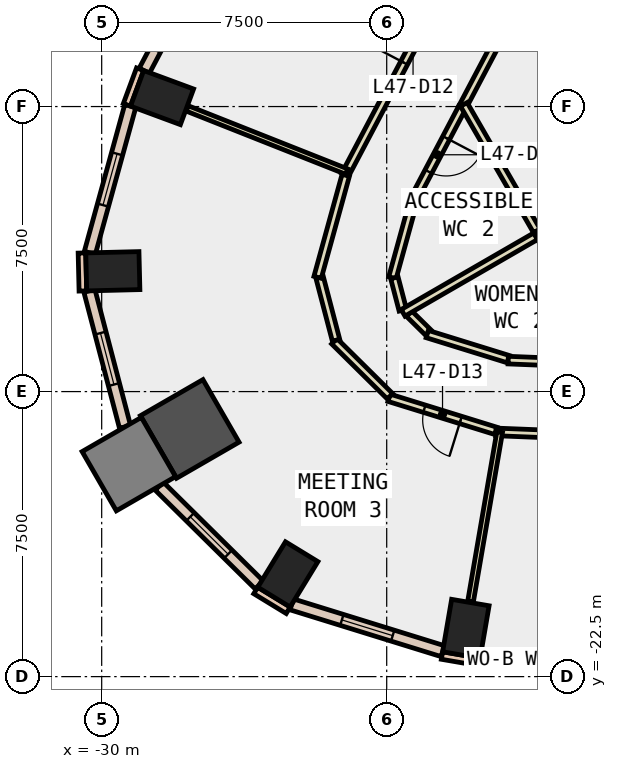
"""IFC4 building model, lengths in metres.
Left out: names, types, materials, properties, quantities, classifications, styles, units other than length and angle.
Written with IfcOpenShell. Run it as: python <this file> out.ifc"""

import sys

from ifc_helpers import new_model, si_unit, direction, frame, frame_2d, origin, origin_2d, place, context, subcontext, project, spatial, rectangle, extrude, element, fill, save


model = new_model("IFC4")
c1 = context("Model", 3, precision=1e-05, world=origin(), true_north=direction((0.0, 1.0)))
c2 = subcontext(c1, "Body", "Model", "MODEL_VIEW")
j1 = project(units=[si_unit("LENGTHUNIT", "METRE"), si_unit("PLANEANGLEUNIT", "RADIAN")], contexts=[c1])
p1 = place(None, origin())
s1 = spatial("IfcSite", under=j1, at=p1, CompositionType="ELEMENT")
p2 = place(p1, origin())
s2 = spatial("IfcBuilding", under=s1, at=p2, CompositionType="ELEMENT")
p3 = place(p2, frame((0.0, 0.0, 210.8)))
s3 = spatial("IfcBuildingStorey", under=s2, at=p3, CompositionType="ELEMENT", Elevation=210.8)
for number, where, z_axis, x_axis in (
    (1, (-20.417, -21.241, -0.4), (0.0, 0.0, 1.0), (-0.986, 0.169, 0.0)),
    (2, (-28.412, -7.264, -0.4), (0.0, 0.0, 1.0), (0.347, 0.938, 0.0)),
    (3, (-29.707, -11.834, -0.4), (0.0, 0.0, 1.0), (-0.025, 1.0, 0.0)),
):
    element("IfcColumn", number, at=place(p3, frame(where, z_axis=z_axis, x_axis=x_axis)), inside=s3, PredefinedType="COLUMN", context=c2, shape_type="SweptSolid", body=[
        extrude(rectangle(XDim=1.0, YDim=1.4, at=origin_2d()), origin(), (0.0, 0.0, 1.0), 4.2),
    ])
p4 = place(p3, frame((-27.683, -15.983, -0.4), z_axis=(0.0, 0.0, 1.0), x_axis=(0.866025403784, 0.5, 0.0)))
e4 = element("IfcColumn", 4, at=p4, inside=s3, PredefinedType="COLUMN", context=c2, shape_type="SweptSolid", body=[
    extrude(rectangle(XDim=1.9, YDim=1.9, at=origin_2d()), origin(), (0.0, 0.0, 1.0), 4.2),
])
p5 = place(p3, frame((-25.102, -19.811, -0.4), z_axis=(0.0, 0.0, 1.0), x_axis=(-0.853423465127, 0.521218178089, 0.0)))
e5 = element("IfcColumn", 5, at=p5, inside=s3, PredefinedType="COLUMN", context=c2, shape_type="SweptSolid", body=[
    extrude(rectangle(XDim=1.0, YDim=1.4, at=origin_2d()), origin(), (0.0, 0.0, 1.0), 4.2),
])
p6 = place(p3, frame((-29.285, -16.908, -0.4), z_axis=(0.0, 0.0, 1.0), x_axis=(0.866025403784, 0.5, 0.0)))
e6 = element("IfcColumn", 6, at=p6, inside=s3, PredefinedType="COLUMN", context=c2, shape_type="SweptSolid", body=[
    extrude(rectangle(XDim=1.8, YDim=1.8, at=origin_2d()), origin(), (0.0, 0.0, 1.0), 4.2),
])
p7 = place(p3, frame((-28.989, -6.518, 0.0), z_axis=(0.0, 0.0, 1.0), x_axis=(-0.346892928577, -0.937904737222, 0.0)))
e7 = element("IfcWall", 7, at=p7, inside=s3, PredefinedType="STANDARD", context=c2, shape_type="SweptSolid", body=[
    extrude(rectangle(XDim=1.0, YDim=0.2, at=frame_2d((0.5, 0.0))), origin(), (0.0, 0.0, 1.0), 3.8),
])
p8 = place(p3, frame((-21.045, -21.945, 0.0), z_axis=(0.0, 0.0, 1.0), x_axis=(0.985631544579, -0.168909615862, 0.0)))
e8 = element("IfcWall", 8, at=p8, inside=s3, PredefinedType="STANDARD", context=c2, shape_type="SweptSolid", body=[
    extrude(rectangle(XDim=1.0, YDim=0.2, at=frame_2d((0.5, 0.0))), origin(), (0.0, 0.0, 1.0), 3.8),
])
p9 = place(p3, frame((-30.519, -11.354, 0.0), z_axis=(0.0, 0.0, 1.0), x_axis=(0.023942303888, -0.999713341956, 0.0)))
e9 = element("IfcWall", 9, at=p9, inside=s3, PredefinedType="STANDARD", context=c2, shape_type="SweptSolid", body=[
    extrude(rectangle(XDim=0.999, YDim=0.2, at=frame_2d((0.5, 0.0))), origin(), (0.0, 0.0, 1.0), 3.8),
])
p10 = place(p3, frame((-25.946, -20.233, 0.0), z_axis=(0.0, 0.0, 1.0), x_axis=(0.853679739553, -0.520798331677, 0.0)))
e10 = element("IfcWall", 10, at=p10, inside=s3, PredefinedType="STANDARD", context=c2, shape_type="SweptSolid", body=[
    extrude(rectangle(XDim=1.0, YDim=0.2, at=frame_2d((0.5, 0.0))), origin(), (0.0, 0.0, 1.0), 3.8),
])
p11 = place(p3, frame((-20.04, -21.999, 0.0), z_axis=(0.0, 0.0, 1.0), x_axis=(0.999205241612, -0.039860822062, 0.0)))
e11 = element("IfcWall", 11, at=p11, inside=s3, PredefinedType="STANDARD", context=c2, shape_type="SweptSolid", body=[
    extrude(rectangle(XDim=5.365, YDim=0.3, at=frame_2d((2.683, 0.0))), origin(), (0.0, 0.0, 1.0), 3.8),
])
p12 = place(p11, frame((0.641, 0.0, 0.9)))
e12 = element("IfcOpeningElement", 12, at=p12, cuts=e11, PredefinedType="OPENING", context=c2, shape_type="SweptSolid", body=[
    extrude(rectangle(XDim=1.4, YDim=2.6, at=frame_2d((0.7, 1.3))), frame((0.0, 0.16, 0.0), z_axis=(0.0, -1.0, 0.0), x_axis=(1.0, 0.0, 0.0)), (0.0, 0.0, 1.0), 0.32),
])
p13 = place(p11, frame((3.324, 0.0, 0.9)))
e13 = element("IfcOpeningElement", 13, at=p13, cuts=e11, PredefinedType="OPENING", context=c2, shape_type="SweptSolid", body=[
    extrude(rectangle(XDim=1.4, YDim=2.6, at=frame_2d((0.7, 1.3))), frame((0.0, 0.16, 0.0), z_axis=(0.0, -1.0, 0.0), x_axis=(1.0, 0.0, 0.0)), (0.0, 0.0, 1.0), 0.32),
])
p14 = place(p3, frame((-25.484, -0.127, 0.0), z_axis=(0.0, 0.0, 1.0), x_axis=(-0.466789249342, -0.884368586449, 0.0)))
e14 = element("IfcWall", 14, at=p14, inside=s3, PredefinedType="STANDARD", context=c2, shape_type="SweptSolid", body=[
    extrude(rectangle(XDim=7.273, YDim=0.3, at=frame_2d((3.637, 0.0))), origin(), (0.0, 0.0, 1.0), 3.8),
])
p15 = place(p14, frame((0.618, 0.0, 0.9)))
e15 = element("IfcOpeningElement", 15, at=p15, cuts=e14, PredefinedType="OPENING", context=c2, shape_type="SweptSolid", body=[
    extrude(rectangle(XDim=2.4, YDim=2.6, at=frame_2d((1.2, 1.3))), frame((0.0, 0.16, 0.0), z_axis=(0.0, -1.0, 0.0), x_axis=(1.0, 0.0, 0.0)), (0.0, 0.0, 1.0), 0.32),
])
p16 = place(p14, frame((4.255, 0.0, 0.9)))
e16 = element("IfcOpeningElement", 16, at=p16, cuts=e14, PredefinedType="OPENING", context=c2, shape_type="SweptSolid", body=[
    extrude(rectangle(XDim=2.4, YDim=2.6, at=frame_2d((1.2, 1.3))), frame((0.0, 0.16, 0.0), z_axis=(0.0, -1.0, 0.0), x_axis=(1.0, 0.0, 0.0)), (0.0, 0.0, 1.0), 0.32),
])
p17 = place(p3, frame((-29.248, -7.487, 0.0), z_axis=(0.0, 0.0, 1.0), x_axis=(-0.265534577923, -0.96410133696, 0.0)))
e17 = element("IfcWall", 17, at=p17, inside=s3, PredefinedType="STANDARD", context=c2, shape_type="SweptSolid", body=[
    extrude(rectangle(XDim=4.007, YDim=0.3, at=frame_2d((2.003, 0.0))), origin(), (0.0, 0.0, 1.0), 3.8),
])
p18 = place(p17, frame((1.303, 0.0, 0.9)))
e18 = element("IfcOpeningElement", 18, at=p18, cuts=e17, PredefinedType="OPENING", context=c2, shape_type="SweptSolid", body=[
    extrude(rectangle(XDim=1.4, YDim=2.6, at=frame_2d((0.7, 1.3))), frame((0.0, 0.16, 0.0), z_axis=(0.0, -1.0, 0.0), x_axis=(1.0, 0.0, 0.0)), (0.0, 0.0, 1.0), 0.32),
])
p19 = place(p3, frame((-30.323, -12.348, 0.0), z_axis=(0.0, 0.0, 1.0), x_axis=(0.253200635583, -0.96741378848, 0.0)))
e19 = element("IfcWall", 19, at=p19, inside=s3, PredefinedType="STANDARD", context=c2, shape_type="SweptSolid", body=[
    extrude(rectangle(XDim=3.701, YDim=0.3, at=frame_2d((1.85, 0.0))), origin(), (0.0, 0.0, 1.0), 3.8),
])
p20 = place(p19, frame((1.15, 0.0, 0.9)))
e20 = element("IfcOpeningElement", 20, at=p20, cuts=e19, PredefinedType="OPENING", context=c2, shape_type="SweptSolid", body=[
    extrude(rectangle(XDim=1.4, YDim=2.6, at=frame_2d((0.7, 1.3))), frame((0.0, 0.16, 0.0), z_axis=(0.0, -1.0, 0.0), x_axis=(1.0, 0.0, 0.0)), (0.0, 0.0, 1.0), 0.32),
])
p21 = place(p3, frame((-28.487, -17.486, 0.0), z_axis=(0.0, 0.0, 1.0), x_axis=(0.711316812334, -0.702871533419, 0.0)))
e21 = element("IfcWall", 21, at=p21, inside=s3, PredefinedType="STANDARD", context=c2, shape_type="SweptSolid", body=[
    extrude(rectangle(XDim=3.7, YDim=0.3, at=frame_2d((1.85, 0.0))), origin(), (0.0, 0.0, 1.0), 3.8),
])
p22 = place(p21, frame((1.15, 0.0, 0.9)))
e22 = element("IfcOpeningElement", 22, at=p22, cuts=e21, PredefinedType="OPENING", context=c2, shape_type="SweptSolid", body=[
    extrude(rectangle(XDim=1.4, YDim=2.6, at=frame_2d((0.7, 1.3))), frame((0.0, 0.16, 0.0), z_axis=(0.0, -1.0, 0.0), x_axis=(1.0, 0.0, 0.0)), (0.0, 0.0, 1.0), 0.32),
])
p23 = place(p3, frame((-24.999, -20.599, 0.0), z_axis=(0.0, 0.0, 1.0), x_axis=(0.955247215067, -0.295808651171, 0.0)))
e23 = element("IfcWall", 23, at=p23, inside=s3, PredefinedType="STANDARD", context=c2, shape_type="SweptSolid", body=[
    extrude(rectangle(XDim=4.161, YDim=0.3, at=frame_2d((2.081, 0.0))), origin(), (0.0, 0.0, 1.0), 3.8),
])
p24 = place(p23, frame((1.381, 0.0, 0.9)))
e24 = element("IfcOpeningElement", 24, at=p24, cuts=e23, PredefinedType="OPENING", context=c2, shape_type="SweptSolid", body=[
    extrude(rectangle(XDim=1.4, YDim=2.6, at=frame_2d((0.7, 1.3))), frame((0.0, 0.16, 0.0), z_axis=(0.0, -1.0, 0.0), x_axis=(1.0, 0.0, 0.0)), (0.0, 0.0, 1.0), 0.32),
])
p25 = place(p3, frame((-18.344, -3.417, 0.0), z_axis=(0.0, 0.0, 1.0), x_axis=(-0.466889669343, -0.884315575267, 0.0)))
e25 = element("IfcWall", 25, at=p25, inside=s3, PredefinedType="PARTITIONING", context=c2, shape_type="SweptSolid", body=[
    extrude(rectangle(XDim=4.654, YDim=0.2, at=frame_2d((2.327, 0.0))), origin(), (0.0, 0.0, 1.0), 3.8),
])
p26 = place(p25, frame((1.827, 0.0, 0.0)))
e26 = element("IfcOpeningElement", 26, at=p26, cuts=e25, PredefinedType="OPENING", context=c2, shape_type="SweptSolid", body=[
    extrude(rectangle(XDim=1.0, YDim=2.1, at=frame_2d((0.5, 1.05))), frame((0.0, 0.11, 0.0), z_axis=(0.0, -1.0, 0.0), x_axis=(1.0, 0.0, 0.0)), (0.0, 0.0, 1.0), 0.22),
])
p27 = place(p3, frame((-20.517, -7.533, 0.0), z_axis=(0.0, 0.0, 1.0), x_axis=(-0.466570716246, -0.88448389852, 0.0)))
e27 = element("IfcWall", 27, at=p27, inside=s3, PredefinedType="PARTITIONING", context=c2, shape_type="SweptSolid", body=[
    extrude(rectangle(XDim=2.795, YDim=0.2, at=frame_2d((1.397, 0.0))), origin(), (0.0, 0.0, 1.0), 3.8),
])
p28 = place(p27, frame((0.897, 0.0, 0.0)))
e28 = element("IfcOpeningElement", 28, at=p28, cuts=e27, PredefinedType="OPENING", context=c2, shape_type="SweptSolid", body=[
    extrude(rectangle(XDim=1.0, YDim=2.1, at=frame_2d((0.5, 1.05))), frame((0.0, 0.11, 0.0), z_axis=(0.0, -1.0, 0.0), x_axis=(1.0, 0.0, 0.0)), (0.0, 0.0, 1.0), 0.22),
])
p29 = place(p3, frame((-21.801, -10.013, 0.0), z_axis=(0.0, 0.0, 1.0), x_axis=(-0.265584627827, -0.964087550725, 0.0)))
e29 = element("IfcWall", 29, at=p29, inside=s3, PredefinedType="PARTITIONING", context=c2, shape_type="SweptSolid", body=[
    extrude(rectangle(XDim=2.067, YDim=0.2, at=frame_2d((1.034, 0.0))), origin(), (0.0, 0.0, 1.0), 3.8),
])
p30 = place(p3, frame((-22.298, -12.006, 0.0), z_axis=(0.0, 0.0, 1.0), x_axis=(0.252647929446, -0.967558279251, 0.0)))
e30 = element("IfcWall", 30, at=p30, inside=s3, PredefinedType="PARTITIONING", context=c2, shape_type="SweptSolid", body=[
    extrude(rectangle(XDim=0.879, YDim=0.2, at=frame_2d((0.44, 0.0))), origin(), (0.0, 0.0, 1.0), 3.8),
])
p31 = place(p3, frame((-21.912, -12.948, 0.0), z_axis=(0.0, 0.0, 1.0), x_axis=(0.712089244685, -0.702088959893, 0.0)))
e31 = element("IfcWall", 31, at=p31, inside=s3, PredefinedType="PARTITIONING", context=c2, shape_type="SweptSolid", body=[
    extrude(rectangle(XDim=0.708, YDim=0.2, at=frame_2d((0.354, 0.0))), origin(), (0.0, 0.0, 1.0), 3.8),
])
p32 = place(p3, frame((-21.433, -13.486, 0.0), z_axis=(0.0, 0.0, 1.0), x_axis=(0.955241047187, -0.295828568211, 0.0)))
e32 = element("IfcWall", 32, at=p32, inside=s3, PredefinedType="PARTITIONING", context=c2, shape_type="SweptSolid", body=[
    extrude(rectangle(XDim=2.234, YDim=0.2, at=frame_2d((1.117, 0.0))), origin(), (0.0, 0.0, 1.0), 3.8),
])
p33 = place(p3, frame((-19.303, -14.172, 0.0), z_axis=(0.0, 0.0, 1.0), x_axis=(0.999205458466, -0.03985538574, 0.0)))
e33 = element("IfcWall", 33, at=p33, inside=s3, PredefinedType="PARTITIONING", context=c2, shape_type="SweptSolid", body=[
    extrude(rectangle(XDim=2.683, YDim=0.2, at=frame_2d((1.342, 0.0))), origin(), (0.0, 0.0, 1.0), 3.8),
])
p34 = place(p33, frame((0.842, 0.0, 0.0)))
e34 = element("IfcOpeningElement", 34, at=p34, cuts=e33, PredefinedType="OPENING", context=c2, shape_type="SweptSolid", body=[
    extrude(rectangle(XDim=1.0, YDim=2.1, at=frame_2d((0.5, 1.05))), frame((0.0, 0.11, 0.0), z_axis=(0.0, -1.0, 0.0), x_axis=(1.0, 0.0, 0.0)), (0.0, 0.0, 1.0), 0.22),
])
p35 = place(p3, frame((-23.598, -9.301, 0.0), z_axis=(0.0, 0.0, 1.0), x_axis=(0.466852608943, 0.884335140952, 0.0)))
e35 = element("IfcWall", 35, at=p35, inside=s3, PredefinedType="PARTITIONING", context=c2, shape_type="SweptSolid", body=[
    extrude(rectangle(XDim=7.675, YDim=0.2, at=frame_2d((3.837, 0.0))), origin(), (0.0, 0.0, 1.0), 3.8),
])
p36 = place(p35, frame((3.337, 0.0, 0.0)))
e36 = element("IfcOpeningElement", 36, at=p36, cuts=e35, PredefinedType="OPENING", context=c2, shape_type="SweptSolid", body=[
    extrude(rectangle(XDim=1.0, YDim=2.1, at=frame_2d((0.5, 1.05))), frame((0.0, 0.11, 0.0), z_axis=(0.0, -1.0, 0.0), x_axis=(1.0, 0.0, 0.0)), (0.0, 0.0, 1.0), 0.22),
])
p37 = place(p3, frame((-19.623, -16.035, 0.0), z_axis=(0.0, 0.0, 1.0), x_axis=(-0.955234616163, 0.295849333419, 0.0)))
e37 = element("IfcWall", 37, at=p37, inside=s3, PredefinedType="PARTITIONING", context=c2, shape_type="SweptSolid", body=[
    extrude(rectangle(XDim=2.947, YDim=0.2, at=frame_2d((1.473, 0.0))), origin(), (0.0, 0.0, 1.0), 3.8),
])
p38 = place(p37, frame((0.974, 0.0, 0.0)))
e38 = element("IfcOpeningElement", 38, at=p38, cuts=e37, PredefinedType="OPENING", context=c2, shape_type="SweptSolid", body=[
    extrude(rectangle(XDim=1.0, YDim=2.1, at=frame_2d((0.5, 1.05))), frame((0.0, 0.11, 0.0), z_axis=(0.0, -1.0, 0.0), x_axis=(1.0, 0.0, 0.0)), (0.0, 0.0, 1.0), 0.22),
])
p39 = place(p3, frame((-22.414, -15.123, 0.0), z_axis=(0.0, 0.0, 1.0), x_axis=(-0.710949827962, 0.703242733429, 0.0)))
e39 = element("IfcWall", 39, at=p39, inside=s3, PredefinedType="PARTITIONING", context=c2, shape_type="SweptSolid", body=[
    extrude(rectangle(XDim=2.059, YDim=0.2, at=frame_2d((1.03, 0.0))), origin(), (0.0, 0.0, 1.0), 3.8),
])
p40 = place(p3, frame((-23.833, -13.649, 0.0), z_axis=(0.0, 0.0, 1.0), x_axis=(-0.253025690571, 0.967459559832, 0.0)))
e40 = element("IfcWall", 40, at=p40, inside=s3, PredefinedType="PARTITIONING", context=c2, shape_type="SweptSolid", body=[
    extrude(rectangle(XDim=1.712, YDim=0.2, at=frame_2d((0.856, 0.0))), origin(), (0.0, 0.0, 1.0), 3.8),
])
p41 = place(p3, frame((-24.318, -11.993, 0.0), z_axis=(0.0, 0.0, 1.0), x_axis=(0.265884037198, 0.964005020092, 0.0)))
e41 = element("IfcWall", 41, at=p41, inside=s3, PredefinedType="PARTITIONING", context=c2, shape_type="SweptSolid", body=[
    extrude(rectangle(XDim=2.784, YDim=0.2, at=frame_2d((1.392, 0.0))), origin(), (0.0, 0.0, 1.0), 3.8),
])
p42 = place(p3, frame((-13.986, -16.286, 0.0), z_axis=(0.0, 0.0, 1.0), x_axis=(-0.999206475857, 0.039829870775, 0.0)))
e42 = element("IfcWall", 42, at=p42, inside=s3, PredefinedType="PARTITIONING", context=c2, shape_type="SweptSolid", body=[
    extrude(rectangle(XDim=5.645, YDim=0.2, at=frame_2d((2.823, 0.0))), origin(), (0.0, 0.0, 1.0), 3.8),
])
p43 = place(p42, frame((2.323, 0.0, 0.0)))
e43 = element("IfcOpeningElement", 43, at=p43, cuts=e42, PredefinedType="OPENING", context=c2, shape_type="SweptSolid", body=[
    extrude(rectangle(XDim=1.0, YDim=2.1, at=frame_2d((0.5, 1.05))), frame((0.0, 0.11, 0.0), z_axis=(0.0, -1.0, 0.0), x_axis=(1.0, 0.0, 0.0)), (0.0, 0.0, 1.0), 0.22),
])
p44 = place(p3, frame((-16.595, -9.757, 0.0), z_axis=(0.0, 0.0, 1.0), x_axis=(-0.866053019151, -0.499952165731, 0.0)))
e44 = element("IfcWall", 44, at=p44, inside=s3, PredefinedType="PARTITIONING", context=c2, shape_type="SweptSolid", body=[
    extrude(rectangle(XDim=2.3, YDim=0.2, at=frame_2d((1.15, 0.0))), origin(), (0.0, 0.0, 1.0), 3.8),
])
p45 = place(p3, frame((-18.55, -10.77, 0.0), z_axis=(0.0, 0.0, 1.0), x_axis=(-0.500050869834, 0.86599603208, 0.0)))
e45 = element("IfcWall", 45, at=p45, inside=s3, PredefinedType="PARTITIONING", context=c2, shape_type="SweptSolid", body=[
    extrude(rectangle(XDim=3.839, YDim=0.2, at=frame_2d((1.92, 0.0))), origin(), (0.0, 0.0, 1.0), 3.8),
])
p46 = place(p3, frame((-16.472, -14.37, 0.0), z_axis=(0.0, 0.0, 1.0), x_axis=(-0.500009715097, 0.866019794698, 0.0)))
e46 = element("IfcWall", 46, at=p46, inside=s3, PredefinedType="PARTITIONING", context=c2, shape_type="SweptSolid", body=[
    extrude(rectangle(XDim=3.948, YDim=0.2, at=frame_2d((1.974, 0.0))), origin(), (0.0, 0.0, 1.0), 3.8),
])
p47 = place(p3, frame((-18.583, -10.914, 0.0), z_axis=(0.0, 0.0, 1.0), x_axis=(-0.8659987338, -0.500046190923, 0.0)))
e47 = element("IfcWall", 47, at=p47, inside=s3, PredefinedType="PARTITIONING", context=c2, shape_type="SweptSolid", body=[
    extrude(rectangle(XDim=4.025, YDim=0.2, at=frame_2d((2.013, 0.0))), origin(), (0.0, 0.0, 1.0), 3.8),
])
p48 = place(p3, frame((-23.552, -9.212, 0.0), z_axis=(0.0, 0.0, 1.0), x_axis=(-0.929720624715, 0.368265610639, 0.0)))
e48 = element("IfcWall", 48, at=p48, inside=s3, PredefinedType="PARTITIONING", context=c2, shape_type="SweptSolid", body=[
    extrude(rectangle(XDim=4.515, YDim=0.15, at=frame_2d((2.258, 0.0))), origin(), (0.0, 0.0, 1.0), 3.8),
])
p49 = place(p3, frame((-19.527, -16.065, 0.0), z_axis=(0.0, 0.0, 1.0), x_axis=(-0.169437821314, -0.985540879268, 0.0)))
e49 = element("IfcWall", 49, at=p49, inside=s3, PredefinedType="PARTITIONING", context=c2, shape_type="SweptSolid", body=[
    extrude(rectangle(XDim=4.531, YDim=0.15, at=frame_2d((2.266, 0.0))), origin(), (0.0, 0.0, 1.0), 3.8),
])
p50 = place(p12, origin())
e50 = element("IfcWindow", 50, at=p50, inside=s3, PartitioningType="SINGLE_PANEL", PredefinedType="WINDOW", context=c2, shape_type="SweptSolid", body=[
    extrude(rectangle(XDim=1.4, YDim=2.6, at=frame_2d((0.7, 1.3))), frame((0.0, 0.03, 0.0), z_axis=(0.0, -1.0, 0.0), x_axis=(1.0, 0.0, 0.0)), (0.0, 0.0, 1.0), 0.06),
])
fill(e12, e50)
p51 = place(p18, origin())
e51 = element("IfcWindow", 51, at=p51, inside=s3, PartitioningType="SINGLE_PANEL", PredefinedType="WINDOW", context=c2, shape_type="SweptSolid", body=[
    extrude(rectangle(XDim=1.4, YDim=2.6, at=frame_2d((0.7, 1.3))), frame((0.0, 0.03, 0.0), z_axis=(0.0, -1.0, 0.0), x_axis=(1.0, 0.0, 0.0)), (0.0, 0.0, 1.0), 0.06),
])
fill(e18, e51)
p52 = place(p20, origin())
e52 = element("IfcWindow", 52, at=p52, inside=s3, PartitioningType="SINGLE_PANEL", PredefinedType="WINDOW", context=c2, shape_type="SweptSolid", body=[
    extrude(rectangle(XDim=1.4, YDim=2.6, at=frame_2d((0.7, 1.3))), frame((0.0, 0.03, 0.0), z_axis=(0.0, -1.0, 0.0), x_axis=(1.0, 0.0, 0.0)), (0.0, 0.0, 1.0), 0.06),
])
fill(e20, e52)
p53 = place(p22, origin())
e53 = element("IfcWindow", 53, at=p53, inside=s3, PartitioningType="SINGLE_PANEL", PredefinedType="WINDOW", context=c2, shape_type="SweptSolid", body=[
    extrude(rectangle(XDim=1.4, YDim=2.6, at=frame_2d((0.7, 1.3))), frame((0.0, 0.03, 0.0), z_axis=(0.0, -1.0, 0.0), x_axis=(1.0, 0.0, 0.0)), (0.0, 0.0, 1.0), 0.06),
])
fill(e22, e53)
p54 = place(p24, origin())
e54 = element("IfcWindow", 54, at=p54, inside=s3, PartitioningType="SINGLE_PANEL", PredefinedType="WINDOW", context=c2, shape_type="SweptSolid", body=[
    extrude(rectangle(XDim=1.4, YDim=2.6, at=frame_2d((0.7, 1.3))), frame((0.0, 0.03, 0.0), z_axis=(0.0, -1.0, 0.0), x_axis=(1.0, 0.0, 0.0)), (0.0, 0.0, 1.0), 0.06),
])
fill(e24, e54)
p55 = place(p36, origin())
e55 = element("IfcDoor", 55, at=p55, inside=s3, OperationType="SINGLE_SWING_LEFT", PredefinedType="DOOR", context=c2, shape_type="SweptSolid", body=[
    extrude(rectangle(XDim=1.0, YDim=2.1, at=frame_2d((0.5, 1.05))), frame((0.0, 0.025, 0.0), z_axis=(0.0, -1.0, 0.0), x_axis=(1.0, 0.0, 0.0)), (0.0, 0.0, 1.0), 0.05),
])
fill(e36, e55)
p56 = place(p38, origin())
e56 = element("IfcDoor", 56, at=p56, inside=s3, OperationType="SINGLE_SWING_LEFT", PredefinedType="DOOR", context=c2, shape_type="SweptSolid", body=[
    extrude(rectangle(XDim=1.0, YDim=2.1, at=frame_2d((0.5, 1.05))), frame((0.0, 0.025, 0.0), z_axis=(0.0, -1.0, 0.0), x_axis=(1.0, 0.0, 0.0)), (0.0, 0.0, 1.0), 0.05),
])
fill(e38, e56)
p57 = place(p28, origin())
e57 = element("IfcDoor", 57, at=p57, inside=s3, OperationType="SINGLE_SWING_LEFT", PredefinedType="DOOR", context=c2, shape_type="SweptSolid", body=[
    extrude(rectangle(XDim=1.0, YDim=2.1, at=frame_2d((0.5, 1.05))), frame((0.0, 0.025, 0.0), z_axis=(0.0, -1.0, 0.0), x_axis=(1.0, 0.0, 0.0)), (0.0, 0.0, 1.0), 0.05),
])
fill(e28, e57)
save(model, sys.argv[1])
